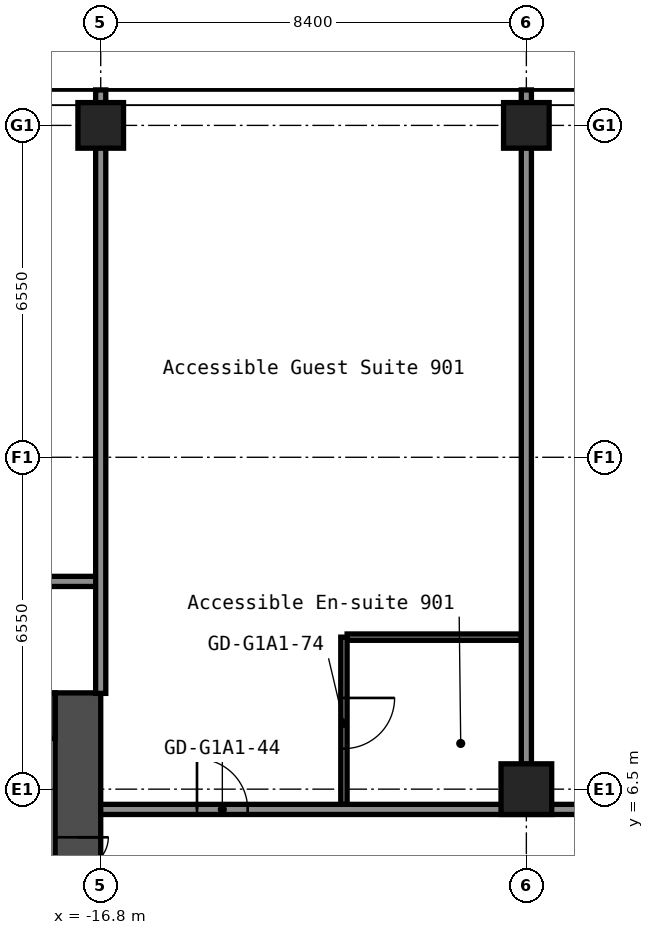
"""IFC4 building model, lengths in metres.
Left out: names, types, materials, properties, quantities, classifications, styles, units other than length and angle.
Written with IfcOpenShell. Run it as: python <this file> out.ifc"""

import sys

from ifc_helpers import new_model, si_unit, direction, frame, frame_2d, origin, origin_2d, place, context, subcontext, project, spatial, rectangle, hollow_rectangle, extrude, element, fill, save


model = new_model("IFC4")
c1 = context("Model", 3, precision=1e-05, world=origin(), true_north=direction((0.0, 1.0)))
c2 = subcontext(c1, "Body", "Model", "MODEL_VIEW")
j1 = project(units=[si_unit("LENGTHUNIT", "METRE"), si_unit("PLANEANGLEUNIT", "RADIAN")], contexts=[c1])
p1 = place(None, origin())
s1 = spatial("IfcSite", under=j1, at=p1, CompositionType="ELEMENT")
p2 = place(p1, origin())
s2 = spatial("IfcBuilding", under=s1, at=p2, CompositionType="ELEMENT")
p3 = place(p2, frame((0.0, 0.0, 35.8)))
s3 = spatial("IfcBuildingStorey", under=s2, at=p3, CompositionType="ELEMENT", Elevation=35.8)
p4 = place(p3, frame((-16.8, 19.6, 0.0), z_axis=(0.0, 0.0, 1.0), x_axis=(1.0, 0.0, 0.0)))
e1 = element("IfcColumn", 1, at=p4, inside=s3, PredefinedType="COLUMN", context=c2, shape_type="SweptSolid", body=[
    extrude(hollow_rectangle(XDim=0.9, YDim=0.9, WallThickness=0.036, at=origin_2d()), origin(), (0.0, 0.0, 1.0), 2.8),
])
p5 = place(p3, frame((-8.4, 6.5, 0.0), z_axis=(0.0, 0.0, 1.0), x_axis=(1.0, 0.0, 0.0)))
e2 = element("IfcColumn", 2, at=p5, inside=s3, PredefinedType="COLUMN", context=c2, shape_type="SweptSolid", body=[
    extrude(hollow_rectangle(XDim=1.0, YDim=1.0, WallThickness=0.04, at=origin_2d()), origin(), (0.0, 0.0, 1.0), 2.8),
])
p6 = place(p3, frame((-8.4, 19.6, 0.0), z_axis=(0.0, 0.0, 1.0), x_axis=(1.0, 0.0, 0.0)))
e3 = element("IfcColumn", 3, at=p6, inside=s3, PredefinedType="COLUMN", context=c2, shape_type="SweptSolid", body=[
    extrude(hollow_rectangle(XDim=0.9, YDim=0.9, WallThickness=0.036, at=origin_2d()), origin(), (0.0, 0.0, 1.0), 2.8),
])
p7 = place(p3, frame((-17.25, -8.4, 0.0), z_axis=(0.0, 0.0, 1.0), x_axis=(0.0, 1.0, 0.0)))
e4 = element("IfcWall", 4, at=p7, inside=s3, PredefinedType="SHEAR", context=c2, shape_type="SweptSolid", body=[
    extrude(rectangle(XDim=16.8, YDim=0.9, at=frame_2d((8.4, 0.0))), origin(), (0.0, 0.0, 1.0), 2.8),
])
p8 = place(p7, frame((12.75, 0.0, 0.0)))
e5 = element("IfcOpeningElement", 5, at=p8, cuts=e4, PredefinedType="OPENING", context=c2, shape_type="SweptSolid", body=[
    extrude(rectangle(XDim=1.2, YDim=2.1, at=frame_2d((0.6, 1.05))), frame((0.0, 0.46, 0.0), z_axis=(0.0, -1.0, 0.0), x_axis=(1.0, 0.0, 0.0)), (0.0, 0.0, 1.0), 0.92),
])
p9 = place(p7, frame((2.85, 0.0, 0.0)))
e6 = element("IfcOpeningElement", 6, at=p9, cuts=e4, PredefinedType="OPENING", context=c2, shape_type="SweptSolid", body=[
    extrude(rectangle(XDim=1.2, YDim=2.1, at=frame_2d((0.6, 1.05))), frame((0.0, 0.46, 0.0), z_axis=(0.0, -1.0, 0.0), x_axis=(1.0, 0.0, 0.0)), (0.0, 0.0, 1.0), 0.92),
])
p10 = place(p3, frame((-32.7, 7.95, 0.0), z_axis=(0.0, 0.0, 1.0), x_axis=(1.0, 0.0, 0.0)))
e7 = element("IfcWall", 7, at=p10, inside=s3, PredefinedType="SHEAR", context=c2, shape_type="SweptSolid", body=[
    extrude(rectangle(XDim=15.0, YDim=0.9, at=frame_2d((7.5, 0.0))), origin(), (0.0, 0.0, 1.0), 2.8),
])
p11 = place(p10, frame((3.4, 0.0, 0.0)))
e8 = element("IfcOpeningElement", 8, at=p11, cuts=e7, PredefinedType="OPENING", context=c2, shape_type="SweptSolid", body=[
    extrude(rectangle(XDim=1.2, YDim=2.1, at=frame_2d((0.6, 1.05))), frame((0.0, 0.46, 0.0), z_axis=(0.0, -1.0, 0.0), x_axis=(1.0, 0.0, 0.0)), (0.0, 0.0, 1.0), 0.92),
])
p12 = place(p10, frame((0.75, 0.0, 0.0)))
e9 = element("IfcOpeningElement", 9, at=p12, cuts=e7, PredefinedType="OPENING", context=c2, shape_type="SweptSolid", body=[
    extrude(rectangle(XDim=0.9, YDim=2.1, at=frame_2d((0.45, 1.05))), frame((0.0, 0.46, 0.0), z_axis=(0.0, -1.0, 0.0), x_axis=(1.0, 0.0, 0.0)), (0.0, 0.0, 1.0), 0.92),
])
p13 = place(p3, frame((-16.8, 6.1, 0.0), z_axis=(0.0, 0.0, 1.0), x_axis=(1.0, 0.0, 0.0)))
e10 = element("IfcWall", 10, at=p13, inside=s3, PredefinedType="PARTITIONING", context=c2, shape_type="SweptSolid", body=[
    extrude(rectangle(XDim=33.6, YDim=0.2, at=frame_2d((16.8, 0.0))), origin(), (0.0, 0.0, 1.0), 2.8),
])
p14 = place(p13, frame((1.9, 0.0, 0.0)))
e11 = element("IfcOpeningElement", 11, at=p14, cuts=e10, PredefinedType="OPENING", context=c2, shape_type="SweptSolid", body=[
    extrude(rectangle(XDim=1.0, YDim=2.1, at=frame_2d((0.5, 1.05))), frame((0.0, 0.11, 0.0), z_axis=(0.0, -1.0, 0.0), x_axis=(1.0, 0.0, 0.0)), (0.0, 0.0, 1.0), 0.22),
])
p15 = place(p13, frame((9.63, 0.0, 0.0)))
e12 = element("IfcOpeningElement", 12, at=p15, cuts=e10, PredefinedType="OPENING", context=c2, shape_type="SweptSolid", body=[
    extrude(rectangle(XDim=0.9, YDim=2.1, at=frame_2d((0.45, 1.05))), frame((0.0, 0.11, 0.0), z_axis=(0.0, -1.0, 0.0), x_axis=(1.0, 0.0, 0.0)), (0.0, 0.0, 1.0), 0.22),
])
p16 = place(p13, frame((13.83, 0.0, 0.0)))
e13 = element("IfcOpeningElement", 13, at=p16, cuts=e10, PredefinedType="OPENING", context=c2, shape_type="SweptSolid", body=[
    extrude(rectangle(XDim=0.9, YDim=2.1, at=frame_2d((0.45, 1.05))), frame((0.0, 0.11, 0.0), z_axis=(0.0, -1.0, 0.0), x_axis=(1.0, 0.0, 0.0)), (0.0, 0.0, 1.0), 0.22),
])
p17 = place(p13, frame((18.785, 0.0, 0.0)))
e14 = element("IfcOpeningElement", 14, at=p17, cuts=e10, PredefinedType="OPENING", context=c2, shape_type="SweptSolid", body=[
    extrude(rectangle(XDim=0.9, YDim=2.1, at=frame_2d((0.45, 1.05))), frame((0.0, 0.11, 0.0), z_axis=(0.0, -1.0, 0.0), x_axis=(1.0, 0.0, 0.0)), (0.0, 0.0, 1.0), 0.22),
])
p18 = place(p13, frame((22.985, 0.0, 0.0)))
e15 = element("IfcOpeningElement", 15, at=p18, cuts=e10, PredefinedType="OPENING", context=c2, shape_type="SweptSolid", body=[
    extrude(rectangle(XDim=0.9, YDim=2.1, at=frame_2d((0.45, 1.05))), frame((0.0, 0.11, 0.0), z_axis=(0.0, -1.0, 0.0), x_axis=(1.0, 0.0, 0.0)), (0.0, 0.0, 1.0), 0.22),
])
p19 = place(p13, frame((27.2, 0.0, 0.0)))
e16 = element("IfcOpeningElement", 16, at=p19, cuts=e10, PredefinedType="OPENING", context=c2, shape_type="SweptSolid", body=[
    extrude(rectangle(XDim=1.0, YDim=2.1, at=frame_2d((0.5, 1.05))), frame((0.0, 0.11, 0.0), z_axis=(0.0, -1.0, 0.0), x_axis=(1.0, 0.0, 0.0)), (0.0, 0.0, 1.0), 0.22),
])
p20 = place(p3, frame((-11.938, 9.5, 0.0), z_axis=(0.0, 0.0, 1.0), x_axis=(1.0, 0.0, 0.0)))
e17 = element("IfcWall", 17, at=p20, inside=s3, PredefinedType="PARTITIONING", context=c2, shape_type="SweptSolid", body=[
    extrude(rectangle(XDim=3.438, YDim=0.125, at=frame_2d((1.719, 0.0))), origin(), (0.0, 0.0, 1.0), 2.8),
])
p21 = place(p3, frame((-51.1, 10.6, 0.0), z_axis=(0.0, 0.0, 1.0), x_axis=(1.0, 0.0, 0.0)))
e18 = element("IfcWall", 18, at=p21, inside=s3, PredefinedType="PARTITIONING", context=c2, shape_type="SweptSolid", body=[
    extrude(rectangle(XDim=34.3, YDim=0.2, at=frame_2d((17.15, 0.0))), origin(), (0.0, 0.0, 1.0), 2.8),
])
p22 = place(p21, frame((2.4, 0.0, 0.0)))
e19 = element("IfcOpeningElement", 19, at=p22, cuts=e18, PredefinedType="OPENING", context=c2, shape_type="SweptSolid", body=[
    extrude(rectangle(XDim=1.0, YDim=2.1, at=frame_2d((0.5, 1.05))), frame((0.0, 0.11, 0.0), z_axis=(0.0, -1.0, 0.0), x_axis=(1.0, 0.0, 0.0)), (0.0, 0.0, 1.0), 0.22),
])
p23 = place(p21, frame((14.5, 0.0, 0.0)))
e20 = element("IfcOpeningElement", 20, at=p23, cuts=e18, PredefinedType="OPENING", context=c2, shape_type="SweptSolid", body=[
    extrude(rectangle(XDim=1.0, YDim=2.1, at=frame_2d((0.5, 1.05))), frame((0.0, 0.11, 0.0), z_axis=(0.0, -1.0, 0.0), x_axis=(1.0, 0.0, 0.0)), (0.0, 0.0, 1.0), 0.22),
])
p24 = place(p21, frame((19.5, 0.0, 0.0)))
e21 = element("IfcOpeningElement", 21, at=p24, cuts=e18, PredefinedType="OPENING", context=c2, shape_type="SweptSolid", body=[
    extrude(rectangle(XDim=1.0, YDim=2.1, at=frame_2d((0.5, 1.05))), frame((0.0, 0.11, 0.0), z_axis=(0.0, -1.0, 0.0), x_axis=(1.0, 0.0, 0.0)), (0.0, 0.0, 1.0), 0.22),
])
p25 = place(p21, frame((31.3, 0.0, 0.0)))
e22 = element("IfcOpeningElement", 22, at=p25, cuts=e18, PredefinedType="OPENING", context=c2, shape_type="SweptSolid", body=[
    extrude(rectangle(XDim=1.0, YDim=2.1, at=frame_2d((0.5, 1.05))), frame((0.0, 0.11, 0.0), z_axis=(0.0, -1.0, 0.0), x_axis=(1.0, 0.0, 0.0)), (0.0, 0.0, 1.0), 0.22),
])
p26 = place(p3, frame((-16.8, 8.39, 0.0), z_axis=(0.0, 0.0, 1.0), x_axis=(0.0, 1.0, 0.0)))
e23 = element("IfcWall", 23, at=p26, inside=s3, PredefinedType="PARTITIONING", context=c2, shape_type="SweptSolid", body=[
    extrude(rectangle(XDim=11.91, YDim=0.2, at=frame_2d((5.955, 0.0))), origin(), (0.0, 0.0, 1.0), 2.8),
])
p27 = place(p3, frame((-12.0, 6.2, 0.0), z_axis=(0.0, 0.0, 1.0), x_axis=(0.0, 1.0, 0.0)))
e24 = element("IfcWall", 24, at=p27, inside=s3, PredefinedType="PARTITIONING", context=c2, shape_type="SweptSolid", body=[
    extrude(rectangle(XDim=3.3, YDim=0.125, at=frame_2d((1.65, 0.0))), origin(), (0.0, 0.0, 1.0), 2.8),
])
p28 = place(p27, frame((1.1, 0.0, 0.0)))
e25 = element("IfcOpeningElement", 25, at=p28, cuts=e24, PredefinedType="OPENING", context=c2, shape_type="SweptSolid", body=[
    extrude(rectangle(XDim=1.0, YDim=2.1, at=frame_2d((0.5, 1.05))), frame((0.0, 0.073, 0.0), z_axis=(0.0, -1.0, 0.0), x_axis=(1.0, 0.0, 0.0)), (0.0, 0.0, 1.0), 0.145),
])
p29 = place(p3, frame((-8.4, 6.99, 0.0), z_axis=(0.0, 0.0, 1.0), x_axis=(0.0, 1.0, 0.0)))
e26 = element("IfcWall", 26, at=p29, inside=s3, PredefinedType="PARTITIONING", context=c2, shape_type="SweptSolid", body=[
    extrude(rectangle(XDim=13.31, YDim=0.2, at=frame_2d((6.655, 0.0))), origin(), (0.0, 0.0, 1.0), 2.8),
])
p30 = place(p8, origin())
e27 = element("IfcDoor", 27, at=p30, inside=s3, OperationType="DOUBLE_DOOR_SINGLE_SWING", PredefinedType="DOOR", context=c2, shape_type="SweptSolid", body=[
    extrude(rectangle(XDim=1.2, YDim=2.1, at=frame_2d((0.6, 1.05))), frame((0.0, 0.025, 0.0), z_axis=(0.0, -1.0, 0.0), x_axis=(1.0, 0.0, 0.0)), (0.0, 0.0, 1.0), 0.05),
])
fill(e5, e27)
p31 = place(p14, origin())
e28 = element("IfcDoor", 28, at=p31, inside=s3, OperationType="SINGLE_SWING_RIGHT", PredefinedType="DOOR", context=c2, shape_type="SweptSolid", body=[
    extrude(rectangle(XDim=1.0, YDim=2.1, at=frame_2d((0.5, 1.05))), frame((0.0, 0.025, 0.0), z_axis=(0.0, -1.0, 0.0), x_axis=(1.0, 0.0, 0.0)), (0.0, 0.0, 1.0), 0.05),
])
fill(e11, e28)
p32 = place(p28, origin())
e29 = element("IfcDoor", 29, at=p32, inside=s3, OperationType="SINGLE_SWING_RIGHT", PredefinedType="DOOR", context=c2, shape_type="SweptSolid", body=[
    extrude(rectangle(XDim=1.0, YDim=2.1, at=frame_2d((0.5, 1.05))), frame((0.0, 0.025, 0.0), z_axis=(0.0, -1.0, 0.0), x_axis=(1.0, 0.0, 0.0)), (0.0, 0.0, 1.0), 0.05),
])
fill(e25, e29)
save(model, sys.argv[1])
